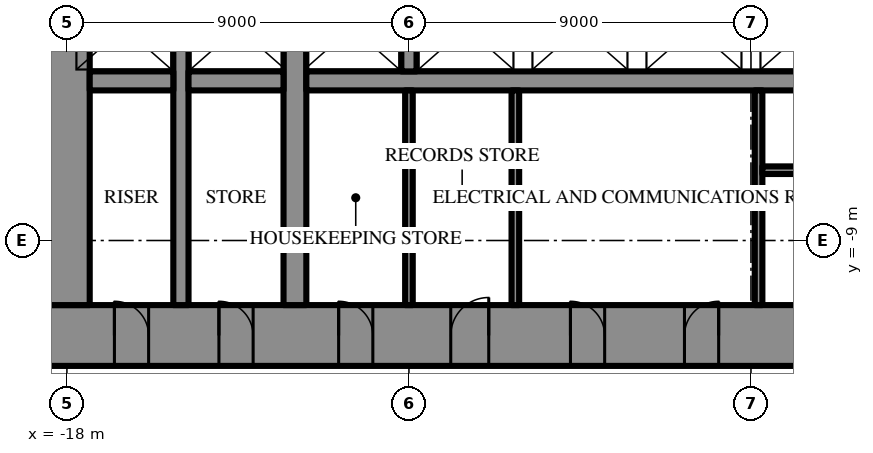
"""IFC4 building model, lengths in metres.
Left out: names, types, materials, properties, quantities, classifications, styles, units other than length and angle.
Written with IfcOpenShell. Run it as: python <this file> out.ifc"""

import sys

from ifc_helpers import new_model, si_unit, direction, frame, frame_2d, origin, place, context, subcontext, project, spatial, rectangle, extrude, element, fill, save


model = new_model("IFC4")
c1 = context("Model", 3, precision=1e-05, world=origin(), true_north=direction((0.0, 1.0)))
c2 = subcontext(c1, "Body", "Model", "MODEL_VIEW")
j1 = project(units=[si_unit("LENGTHUNIT", "METRE"), si_unit("PLANEANGLEUNIT", "RADIAN")], contexts=[c1])
p1 = place(None, origin())
s1 = spatial("IfcSite", under=j1, at=p1, CompositionType="ELEMENT")
p2 = place(p1, origin())
s2 = spatial("IfcBuilding", under=s1, at=p2, CompositionType="ELEMENT")
p3 = place(p2, frame((0.0, 0.0, 48.7)))
s3 = spatial("IfcBuildingStorey", under=s2, at=p3, CompositionType="ELEMENT", Elevation=48.7)
p4 = place(p3, frame((18.6, -11.5, 0.0), z_axis=(0.0, 0.0, 1.0), x_axis=(-1.0, 0.0, 0.0)))
e1 = element("IfcWall", 1, at=p4, inside=s3, PredefinedType="SHEAR", context=c2, shape_type="SweptSolid", body=[
    extrude(rectangle(XDim=37.2, YDim=1.6, at=frame_2d((18.6, 0.0))), origin(), (0.0, 0.0, 1.0), 4.2),
])
p5 = place(p4, frame((19.45, 0.0, 0.0)))
e2 = element("IfcOpeningElement", 2, at=p5, cuts=e1, PredefinedType="OPENING", context=c2, shape_type="SweptSolid", body=[
    extrude(rectangle(XDim=0.9, YDim=2.2, at=frame_2d((0.45, 1.1))), frame((0.0, 0.81, 0.0), z_axis=(0.0, -1.0, 0.0), x_axis=(1.0, 0.0, 0.0)), (0.0, 0.0, 1.0), 1.62),
])
p6 = place(p4, frame((22.45, 0.0, 0.0)))
e3 = element("IfcOpeningElement", 3, at=p6, cuts=e1, PredefinedType="OPENING", context=c2, shape_type="SweptSolid", body=[
    extrude(rectangle(XDim=0.9, YDim=2.2, at=frame_2d((0.45, 1.1))), frame((0.0, 0.81, 0.0), z_axis=(0.0, -1.0, 0.0), x_axis=(1.0, 0.0, 0.0)), (0.0, 0.0, 1.0), 1.62),
])
p7 = place(p4, frame((25.5, 0.0, 0.0)))
e4 = element("IfcOpeningElement", 4, at=p7, cuts=e1, PredefinedType="OPENING", context=c2, shape_type="SweptSolid", body=[
    extrude(rectangle(XDim=1.0, YDim=2.2, at=frame_2d((0.5, 1.1))), frame((0.0, 0.81, 0.0), z_axis=(0.0, -1.0, 0.0), x_axis=(1.0, 0.0, 0.0)), (0.0, 0.0, 1.0), 1.62),
])
p8 = place(p4, frame((1.85, 0.0, 0.0)))
e5 = element("IfcOpeningElement", 5, at=p8, cuts=e1, PredefinedType="OPENING", context=c2, shape_type="SweptSolid", body=[
    extrude(rectangle(XDim=0.9, YDim=2.2, at=frame_2d((0.45, 1.1))), frame((0.0, 0.81, 0.0), z_axis=(0.0, -1.0, 0.0), x_axis=(1.0, 0.0, 0.0)), (0.0, 0.0, 1.0), 1.62),
])
p9 = place(p4, frame((4.6, 0.0, 0.0)))
e6 = element("IfcOpeningElement", 6, at=p9, cuts=e1, PredefinedType="OPENING", context=c2, shape_type="SweptSolid", body=[
    extrude(rectangle(XDim=0.9, YDim=2.2, at=frame_2d((0.45, 1.1))), frame((0.0, 0.81, 0.0), z_axis=(0.0, -1.0, 0.0), x_axis=(1.0, 0.0, 0.0)), (0.0, 0.0, 1.0), 1.62),
])
p10 = place(p4, frame((7.75, 0.0, 0.0)))
e7 = element("IfcOpeningElement", 7, at=p10, cuts=e1, PredefinedType="OPENING", context=c2, shape_type="SweptSolid", body=[
    extrude(rectangle(XDim=0.9, YDim=2.2, at=frame_2d((0.45, 1.1))), frame((0.0, 0.81, 0.0), z_axis=(0.0, -1.0, 0.0), x_axis=(1.0, 0.0, 0.0)), (0.0, 0.0, 1.0), 1.62),
])
p11 = place(p4, frame((28.55, 0.0, 0.0)))
e8 = element("IfcOpeningElement", 8, at=p11, cuts=e1, PredefinedType="OPENING", context=c2, shape_type="SweptSolid", body=[
    extrude(rectangle(XDim=0.9, YDim=2.2, at=frame_2d((0.45, 1.1))), frame((0.0, 0.81, 0.0), z_axis=(0.0, -1.0, 0.0), x_axis=(1.0, 0.0, 0.0)), (0.0, 0.0, 1.0), 1.62),
])
p12 = place(p4, frame((31.7, 0.0, 0.0)))
e9 = element("IfcOpeningElement", 9, at=p12, cuts=e1, PredefinedType="OPENING", context=c2, shape_type="SweptSolid", body=[
    extrude(rectangle(XDim=0.9, YDim=2.2, at=frame_2d((0.45, 1.1))), frame((0.0, 0.81, 0.0), z_axis=(0.0, -1.0, 0.0), x_axis=(1.0, 0.0, 0.0)), (0.0, 0.0, 1.0), 1.62),
])
p13 = place(p4, frame((34.45, 0.0, 0.0)))
e10 = element("IfcOpeningElement", 10, at=p13, cuts=e1, PredefinedType="OPENING", context=c2, shape_type="SweptSolid", body=[
    extrude(rectangle(XDim=0.9, YDim=2.2, at=frame_2d((0.45, 1.1))), frame((0.0, 0.81, 0.0), z_axis=(0.0, -1.0, 0.0), x_axis=(1.0, 0.0, 0.0)), (0.0, 0.0, 1.0), 1.62),
])
p14 = place(p3, frame((-18.0, 10.7, 0.0), z_axis=(0.0, 0.0, 1.0), x_axis=(0.0, -1.0, 0.0)))
e11 = element("IfcWall", 11, at=p14, inside=s3, PredefinedType="SHEAR", context=c2, shape_type="SweptSolid", body=[
    extrude(rectangle(XDim=21.4, YDim=1.2, at=frame_2d((10.7, 0.0))), origin(), (0.0, 0.0, 1.0), 4.2),
])
p15 = place(p14, frame((9.8, 0.0, 0.0)))
e12 = element("IfcOpeningElement", 12, at=p15, cuts=e11, PredefinedType="OPENING", context=c2, shape_type="SweptSolid", body=[
    extrude(rectangle(XDim=1.8, YDim=2.4, at=frame_2d((0.9, 1.2))), frame((0.0, 0.61, 0.0), z_axis=(0.0, -1.0, 0.0), x_axis=(1.0, 0.0, 0.0)), (0.0, 0.0, 1.0), 1.22),
])
p16 = place(p3, frame((-12.0, -10.7, 0.0), z_axis=(0.0, 0.0, 1.0), x_axis=(0.0, 1.0, 0.0)))
e13 = element("IfcWall", 13, at=p16, inside=s3, PredefinedType="SHEAR", context=c2, shape_type="SweptSolid", body=[
    extrude(rectangle(XDim=21.4, YDim=0.6, at=frame_2d((10.7, 0.0))), origin(), (0.0, 0.0, 1.0), 4.2),
])
p17 = place(p16, frame((9.8, 0.0, 0.0)))
e14 = element("IfcOpeningElement", 14, at=p17, cuts=e13, PredefinedType="OPENING", context=c2, shape_type="SweptSolid", body=[
    extrude(rectangle(XDim=1.8, YDim=2.4, at=frame_2d((0.9, 1.2))), frame((0.0, 0.31, 0.0), z_axis=(0.0, -1.0, 0.0), x_axis=(1.0, 0.0, 0.0)), (0.0, 0.0, 1.0), 0.62),
])
p18 = place(p3, frame((-15.0, -10.7, 0.0), z_axis=(0.0, 0.0, 1.0), x_axis=(0.0, 1.0, 0.0)))
e15 = element("IfcWall", 15, at=p18, inside=s3, PredefinedType="SHEAR", context=c2, shape_type="SweptSolid", body=[
    extrude(rectangle(XDim=21.4, YDim=0.4, at=frame_2d((10.7, 0.0))), origin(), (0.0, 0.0, 1.0), 4.2),
])
p19 = place(p18, frame((9.8, 0.0, 0.0)))
e16 = element("IfcOpeningElement", 16, at=p19, cuts=e15, PredefinedType="OPENING", context=c2, shape_type="SweptSolid", body=[
    extrude(rectangle(XDim=1.8, YDim=2.4, at=frame_2d((0.9, 1.2))), frame((0.0, 0.21, 0.0), z_axis=(0.0, -1.0, 0.0), x_axis=(1.0, 0.0, 0.0)), (0.0, 0.0, 1.0), 0.42),
])
p20 = place(p3, frame((11.7, -4.8, 0.0), z_axis=(0.0, 0.0, 1.0), x_axis=(-1.0, 0.0, 0.0)))
e17 = element("IfcWall", 17, at=p20, inside=s3, PredefinedType="SHEAR", context=c2, shape_type="SweptSolid", body=[
    extrude(rectangle(XDim=23.4, YDim=0.5, at=frame_2d((11.7, 0.0))), origin(), (0.0, 0.0, 1.0), 4.2),
])
p21 = place(p20, frame((6.6, 0.0, 0.0)))
e18 = element("IfcOpeningElement", 18, at=p21, cuts=e17, PredefinedType="OPENING", context=c2, shape_type="SweptSolid", body=[
    extrude(rectangle(XDim=1.2, YDim=2.2, at=frame_2d((0.6, 1.1))), frame((0.0, 0.26, 0.0), z_axis=(0.0, -1.0, 0.0), x_axis=(1.0, 0.0, 0.0)), (0.0, 0.0, 1.0), 0.52),
])
p22 = place(p20, frame((3.6, 0.0, 0.0)))
e19 = element("IfcOpeningElement", 19, at=p22, cuts=e17, PredefinedType="OPENING", context=c2, shape_type="SweptSolid", body=[
    extrude(rectangle(XDim=1.2, YDim=2.2, at=frame_2d((0.6, 1.1))), frame((0.0, 0.26, 0.0), z_axis=(0.0, -1.0, 0.0), x_axis=(1.0, 0.0, 0.0)), (0.0, 0.0, 1.0), 0.52),
])
p23 = place(p3, frame((-12.3, -4.8, 0.0), z_axis=(0.0, 0.0, 1.0), x_axis=(-1.0, 0.0, 0.0)))
e20 = element("IfcWall", 20, at=p23, inside=s3, PredefinedType="SHEAR", context=c2, shape_type="SweptSolid", body=[
    extrude(rectangle(XDim=2.5, YDim=0.5, at=frame_2d((1.25, 0.0))), origin(), (0.0, 0.0, 1.0), 4.2),
])
p24 = place(p3, frame((-15.2, -4.8, 0.0), z_axis=(0.0, 0.0, 1.0), x_axis=(-1.0, 0.0, 0.0)))
e21 = element("IfcWall", 21, at=p24, inside=s3, PredefinedType="SHEAR", context=c2, shape_type="SweptSolid", body=[
    extrude(rectangle(XDim=2.2, YDim=0.5, at=frame_2d((1.1, 0.0))), origin(), (0.0, 0.0, 1.0), 4.2),
])
p25 = place(p3, frame((-9.0, -2.25, 0.0), z_axis=(0.0, 0.0, 1.0), x_axis=(0.0, -1.0, 0.0)))
e22 = element("IfcWall", 22, at=p25, inside=s3, PredefinedType="SHEAR", context=c2, shape_type="SweptSolid", body=[
    extrude(rectangle(XDim=2.3, YDim=0.4, at=frame_2d((1.15, 0.0))), origin(), (0.0, 0.0, 1.0), 4.2),
])
p26 = place(p3, frame((0.2, -5.05, 0.0), z_axis=(0.0, 0.0, 1.0), x_axis=(0.0, -1.0, 0.0)))
e23 = element("IfcWall", 23, at=p26, inside=s3, PredefinedType="SHEAR", context=c2, shape_type="SweptSolid", body=[
    extrude(rectangle(XDim=5.65, YDim=0.2, at=frame_2d((2.825, 0.0))), origin(), (0.0, 0.0, 1.0), 4.2),
])
p27 = place(p3, frame((8.9, -7.15, 0.0), z_axis=(0.0, 0.0, 1.0), x_axis=(-1.0, 0.0, 0.0)))
e24 = element("IfcWall", 24, at=p27, inside=s3, PredefinedType="SHEAR", context=c2, shape_type="SweptSolid", body=[
    extrude(rectangle(XDim=8.6, YDim=0.2, at=frame_2d((4.3, 0.0))), origin(), (0.0, 0.0, 1.0), 4.2),
])
p28 = place(p27, frame((0.3, 0.0, 0.0)))
e25 = element("IfcOpeningElement", 25, at=p28, cuts=e24, PredefinedType="OPENING", context=c2, shape_type="SweptSolid", body=[
    extrude(rectangle(XDim=1.0, YDim=2.2, at=frame_2d((0.5, 1.1))), frame((0.0, 0.11, 0.0), z_axis=(0.0, -1.0, 0.0), x_axis=(1.0, 0.0, 0.0)), (0.0, 0.0, 1.0), 0.22),
])
for number, where, z_axis, x_axis in (
    (26, (-9.0, -5.05, 0.0), (0.0, 0.0, 1.0), (0.0, -1.0, 0.0)),
    (27, (-6.2, -5.05, 0.0), (0.0, 0.0, 1.0), (0.0, -1.0, 0.0)),
):
    element("IfcWall", number, at=place(p3, frame(where, z_axis=z_axis, x_axis=x_axis)), inside=s3, PredefinedType="PARTITIONING", context=c2, shape_type="SweptSolid", body=[
        extrude(rectangle(XDim=5.65, YDim=0.2, at=frame_2d((2.825, 0.0))), origin(), (0.0, 0.0, 1.0), 4.0),
    ])
p29 = place(p5, frame((0.9, 0.0, 0.0), z_axis=(0.0, 0.0, 1.0), x_axis=(-1.0, 0.0, 0.0)))
e28 = element("IfcDoor", 28, at=p29, inside=s3, OperationType="SINGLE_SWING_LEFT", PredefinedType="DOOR", context=c2, shape_type="SweptSolid", body=[
    extrude(rectangle(XDim=0.9, YDim=2.2, at=frame_2d((0.45, 1.1))), frame((0.0, 0.025, 0.0), z_axis=(0.0, -1.0, 0.0), x_axis=(1.0, 0.0, 0.0)), (0.0, 0.0, 1.0), 0.05),
])
fill(e2, e28)
p30 = place(p6, frame((0.9, 0.0, 0.0), z_axis=(0.0, 0.0, 1.0), x_axis=(-1.0, 0.0, 0.0)))
e29 = element("IfcDoor", 29, at=p30, inside=s3, OperationType="SINGLE_SWING_RIGHT", PredefinedType="DOOR", context=c2, shape_type="SweptSolid", body=[
    extrude(rectangle(XDim=0.9, YDim=2.2, at=frame_2d((0.45, 1.1))), frame((0.0, 0.025, 0.0), z_axis=(0.0, -1.0, 0.0), x_axis=(1.0, 0.0, 0.0)), (0.0, 0.0, 1.0), 0.05),
])
fill(e3, e29)
p31 = place(p7, frame((1.0, 0.0, 0.0), z_axis=(0.0, 0.0, 1.0), x_axis=(-1.0, 0.0, 0.0)))
e30 = element("IfcDoor", 30, at=p31, inside=s3, OperationType="SINGLE_SWING_LEFT", PredefinedType="DOOR", context=c2, shape_type="SweptSolid", body=[
    extrude(rectangle(XDim=1.0, YDim=2.2, at=frame_2d((0.5, 1.1))), frame((0.0, 0.025, 0.0), z_axis=(0.0, -1.0, 0.0), x_axis=(1.0, 0.0, 0.0)), (0.0, 0.0, 1.0), 0.05),
])
fill(e4, e30)
p32 = place(p11, frame((0.9, 0.0, 0.0), z_axis=(0.0, 0.0, 1.0), x_axis=(-1.0, 0.0, 0.0)))
e31 = element("IfcDoor", 31, at=p32, inside=s3, OperationType="SINGLE_SWING_RIGHT", PredefinedType="DOOR", context=c2, shape_type="SweptSolid", body=[
    extrude(rectangle(XDim=0.9, YDim=2.2, at=frame_2d((0.45, 1.1))), frame((0.0, 0.025, 0.0), z_axis=(0.0, -1.0, 0.0), x_axis=(1.0, 0.0, 0.0)), (0.0, 0.0, 1.0), 0.05),
])
fill(e8, e31)
p33 = place(p12, frame((0.9, 0.0, 0.0), z_axis=(0.0, 0.0, 1.0), x_axis=(-1.0, 0.0, 0.0)))
e32 = element("IfcDoor", 32, at=p33, inside=s3, OperationType="SINGLE_SWING_RIGHT", PredefinedType="DOOR", context=c2, shape_type="SweptSolid", body=[
    extrude(rectangle(XDim=0.9, YDim=2.2, at=frame_2d((0.45, 1.1))), frame((0.0, 0.025, 0.0), z_axis=(0.0, -1.0, 0.0), x_axis=(1.0, 0.0, 0.0)), (0.0, 0.0, 1.0), 0.05),
])
fill(e9, e32)
p34 = place(p13, frame((0.9, 0.0, 0.0), z_axis=(0.0, 0.0, 1.0), x_axis=(-1.0, 0.0, 0.0)))
e33 = element("IfcDoor", 33, at=p34, inside=s3, OperationType="SINGLE_SWING_RIGHT", PredefinedType="DOOR", context=c2, shape_type="SweptSolid", body=[
    extrude(rectangle(XDim=0.9, YDim=2.2, at=frame_2d((0.45, 1.1))), frame((0.0, 0.025, 0.0), z_axis=(0.0, -1.0, 0.0), x_axis=(1.0, 0.0, 0.0)), (0.0, 0.0, 1.0), 0.05),
])
fill(e10, e33)
save(model, sys.argv[1])
